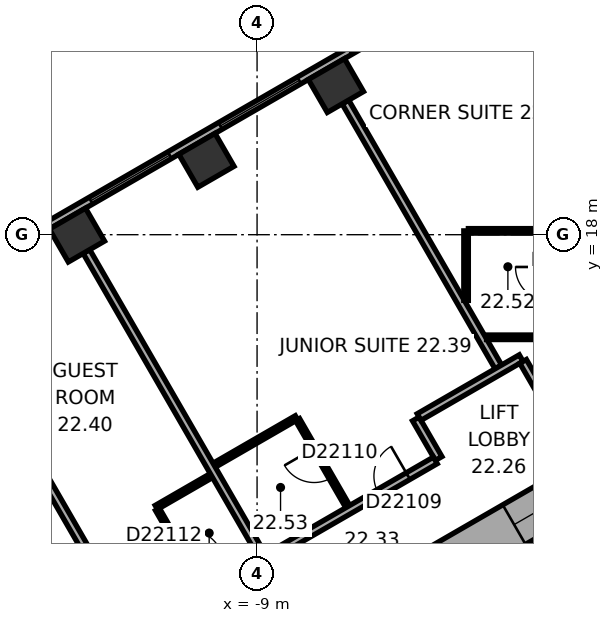
"""IFC4 building model, lengths in metres.
Left out: names, types, materials, properties, quantities, classifications, styles, units other than length and angle.
Written with IfcOpenShell. Run it as: python <this file> out.ifc"""

import sys

from ifc_helpers import new_model, si_unit, direction, frame, frame_2d, origin, origin_2d, place, context, subcontext, project, spatial, rectangle, extrude, element, fill, save


model = new_model("IFC4")
c1 = context("Model", 3, precision=1e-05, world=origin(), true_north=direction((0.0, 1.0)))
c2 = subcontext(c1, "Body", "Model", "MODEL_VIEW")
j1 = project(units=[si_unit("LENGTHUNIT", "METRE"), si_unit("PLANEANGLEUNIT", "RADIAN")], contexts=[c1])
p1 = place(None, origin())
s1 = spatial("IfcSite", under=j1, at=p1, CompositionType="ELEMENT")
p2 = place(p1, origin())
s2 = spatial("IfcBuilding", under=s1, at=p2, CompositionType="ELEMENT")
p3 = place(p2, frame((0.0, 0.0, 96.8)))
s3 = spatial("IfcBuildingStorey", under=s2, at=p3, CompositionType="ELEMENT", Elevation=96.8)
for number, where, z_axis, x_axis in (
    (1, (-6.926, 21.925, 0.0), (0.0, 0.0, 1.0), (-0.866, -0.5, 0.0)),
    (2, (-10.333, 19.957, 0.0), (0.0, 0.0, 1.0), (-0.866, -0.5, 0.0)),
    (3, (-13.74, 17.99, 0.0), (0.0, 0.0, 1.0), (-0.866, -0.5, 0.0)),
):
    element("IfcColumn", number, at=place(p3, frame(where, z_axis=z_axis, x_axis=x_axis)), inside=s3, PredefinedType="COLUMN", context=c2, shape_type="SweptSolid", body=[
        extrude(rectangle(XDim=1.1, YDim=1.0, at=origin_2d()), origin(), (0.0, 0.0, 1.0), 3.3),
    ])
p4 = place(p3, frame((0.3, 11.836, 0.0), z_axis=(0.0, 0.0, 1.0), x_axis=(-0.866021384402, -0.500006961711, 0.0)))
e4 = element("IfcWall", 4, at=p4, inside=s3, PredefinedType="SHEAR", context=c2, shape_type="SweptSolid", body=[
    extrude(rectangle(XDim=12.355, YDim=1.2, at=frame_2d((6.178, 0.0))), origin(), (0.0, 0.0, 1.0), 3.3),
])
p5 = place(p4, frame((6.378, 0.0, 0.0)))
e5 = element("IfcOpeningElement", 5, at=p5, cuts=e4, PredefinedType="OPENING", context=c2, shape_type="SweptSolid", body=[
    extrude(rectangle(XDim=1.5, YDim=2.1, at=frame_2d((0.75, 1.05))), frame((0.0, 0.61, 0.0), z_axis=(0.0, -1.0, 0.0), x_axis=(1.0, 0.0, 0.0)), (0.0, 0.0, 1.0), 1.22),
])
p6 = place(p4, frame((1.828, 0.0, 0.0)))
e6 = element("IfcOpeningElement", 6, at=p6, cuts=e4, PredefinedType="OPENING", context=c2, shape_type="SweptSolid", body=[
    extrude(rectangle(XDim=1.1, YDim=2.1, at=frame_2d((0.55, 1.05))), frame((0.0, 0.61, 0.0), z_axis=(0.0, -1.0, 0.0), x_axis=(1.0, 0.0, 0.0)), (0.0, 0.0, 1.0), 1.22),
])
p7 = place(p3, frame((-3.136, 24.805, 0.0), z_axis=(0.0, 0.0, 1.0), x_axis=(-0.866028291626, -0.499994998079, 0.0)))
e7 = element("IfcWall", 7, at=p7, inside=s3, PredefinedType="STANDARD", context=c2, shape_type="SweptSolid", body=[
    extrude(rectangle(XDim=21.246, YDim=0.2, at=frame_2d((10.623, 0.0))), origin(), (0.0, 0.0, 1.0), 3.3),
])
p8 = place(p7, frame((1.555, 0.0, 0.8)))
e8 = element("IfcOpeningElement", 8, at=p8, cuts=e7, PredefinedType="OPENING", context=c2, shape_type="SweptSolid", body=[
    extrude(rectangle(XDim=2.4, YDim=1.7, at=frame_2d((1.2, 0.85))), frame((0.0, 0.11, 0.0), z_axis=(0.0, -1.0, 0.0), x_axis=(1.0, 0.0, 0.0)), (0.0, 0.0, 1.0), 0.22),
])
p9 = place(p7, frame((5.489, 0.0, 0.8)))
e9 = element("IfcOpeningElement", 9, at=p9, cuts=e7, PredefinedType="OPENING", context=c2, shape_type="SweptSolid", body=[
    extrude(rectangle(XDim=2.4, YDim=1.7, at=frame_2d((1.2, 0.85))), frame((0.0, 0.11, 0.0), z_axis=(0.0, -1.0, 0.0), x_axis=(1.0, 0.0, 0.0)), (0.0, 0.0, 1.0), 0.22),
])
p10 = place(p7, frame((9.424, 0.0, 0.8)))
e10 = element("IfcOpeningElement", 10, at=p10, cuts=e7, PredefinedType="OPENING", context=c2, shape_type="SweptSolid", body=[
    extrude(rectangle(XDim=2.4, YDim=1.7, at=frame_2d((1.2, 0.85))), frame((0.0, 0.11, 0.0), z_axis=(0.0, -1.0, 0.0), x_axis=(1.0, 0.0, 0.0)), (0.0, 0.0, 1.0), 0.22),
])
p11 = place(p7, frame((13.358, 0.0, 0.8)))
e11 = element("IfcOpeningElement", 11, at=p11, cuts=e7, PredefinedType="OPENING", context=c2, shape_type="SweptSolid", body=[
    extrude(rectangle(XDim=2.4, YDim=1.7, at=frame_2d((1.2, 0.85))), frame((0.0, 0.11, 0.0), z_axis=(0.0, -1.0, 0.0), x_axis=(1.0, 0.0, 0.0)), (0.0, 0.0, 1.0), 0.22),
])
p12 = place(p7, frame((17.293, 0.0, 0.8)))
e12 = element("IfcOpeningElement", 12, at=p12, cuts=e7, PredefinedType="OPENING", context=c2, shape_type="SweptSolid", body=[
    extrude(rectangle(XDim=2.4, YDim=1.7, at=frame_2d((1.2, 0.85))), frame((0.0, 0.11, 0.0), z_axis=(0.0, -1.0, 0.0), x_axis=(1.0, 0.0, 0.0)), (0.0, 0.0, 1.0), 0.22),
])
p13 = place(p3, frame((-16.898, 15.59, 0.0), z_axis=(0.0, 0.0, 1.0), x_axis=(0.500023458698, -0.866011859475, 0.0)))
e13 = element("IfcWall", 13, at=p13, inside=s3, PredefinedType="PARTITIONING", context=c2, shape_type="SweptSolid", body=[
    extrude(rectangle(XDim=9.572, YDim=0.2, at=frame_2d((4.786, 0.0))), origin(), (0.0, 0.0, 1.0), 3.05),
])
p14 = place(p3, frame((-11.651, 10.825, 0.0), z_axis=(0.0, 0.0, 1.0), x_axis=(0.865998477143, 0.500046635412, 0.0)))
e14 = element("IfcWall", 14, at=p14, inside=s3, PredefinedType="PARTITIONING", context=c2, shape_type="SweptSolid", body=[
    extrude(rectangle(XDim=1.673, YDim=0.12, at=frame_2d((0.836, 0.0))), origin(), (0.0, 0.0, 1.0), 3.05),
])
p15 = place(p3, frame((-10.401, 8.66, 0.0), z_axis=(0.0, 0.0, 1.0), x_axis=(-0.500077547548, 0.865980627057, 0.0)))
e15 = element("IfcWall", 15, at=p15, inside=s3, PredefinedType="PARTITIONING", context=c2, shape_type="SweptSolid", body=[
    extrude(rectangle(XDim=2.44, YDim=0.12, at=frame_2d((1.22, 0.0))), origin(), (0.0, 0.0, 1.0), 3.05),
])
p16 = place(p15, frame((0.77, 0.0, 0.0)))
e16 = element("IfcOpeningElement", 16, at=p16, cuts=e15, PredefinedType="OPENING", context=c2, shape_type="SweptSolid", body=[
    extrude(rectangle(XDim=0.9, YDim=2.1, at=frame_2d((0.45, 1.05))), frame((0.0, 0.07, 0.0), z_axis=(0.0, -1.0, 0.0), x_axis=(1.0, 0.0, 0.0)), (0.0, 0.0, 1.0), 0.14),
])
p17 = place(p3, frame((-10.129, 11.935, 0.0), z_axis=(0.0, 0.0, 1.0), x_axis=(0.866047370643, 0.499961950354, 0.0)))
e17 = element("IfcWall", 17, at=p17, inside=s3, PredefinedType="PARTITIONING", context=c2, shape_type="SweptSolid", body=[
    extrude(rectangle(XDim=2.5, YDim=0.12, at=frame_2d((1.25, 0.0))), origin(), (0.0, 0.0, 1.0), 3.05),
])
p18 = place(p3, frame((-7.934, 13.133, 0.0), z_axis=(0.0, 0.0, 1.0), x_axis=(0.499938597367, -0.866060851709, 0.0)))
e18 = element("IfcWall", 18, at=p18, inside=s3, PredefinedType="PARTITIONING", context=c2, shape_type="SweptSolid", body=[
    extrude(rectangle(XDim=2.64, YDim=0.12, at=frame_2d((1.32, 0.0))), origin(), (0.0, 0.0, 1.0), 3.05),
])
p19 = place(p18, frame((0.87, 0.0, 0.0)))
e19 = element("IfcOpeningElement", 19, at=p19, cuts=e18, PredefinedType="OPENING", context=c2, shape_type="SweptSolid", body=[
    extrude(rectangle(XDim=0.9, YDim=2.1, at=frame_2d((0.45, 1.05))), frame((0.0, 0.07, 0.0), z_axis=(0.0, -1.0, 0.0), x_axis=(1.0, 0.0, 0.0)), (0.0, 0.0, 1.0), 0.14),
])
p20 = place(p3, frame((-7.865, 7.814, 0.0), z_axis=(0.0, 0.0, 1.0), x_axis=(-0.500004234368, 0.866022959057, 0.0)))
e20 = element("IfcWall", 20, at=p20, inside=s3, PredefinedType="PARTITIONING", context=c2, shape_type="SweptSolid", body=[
    extrude(rectangle(XDim=11.25, YDim=0.2, at=frame_2d((5.625, 0.0))), origin(), (0.0, 0.0, 1.0), 3.05),
])
p21 = place(p20, frame((0.5, 0.0, 0.0)))
e21 = element("IfcOpeningElement", 21, at=p21, cuts=e20, PredefinedType="OPENING", context=c2, shape_type="SweptSolid", body=[
    extrude(rectangle(XDim=0.9, YDim=2.1, at=frame_2d((0.45, 1.05))), frame((0.0, 0.11, 0.0), z_axis=(0.0, -1.0, 0.0), x_axis=(1.0, 0.0, 0.0)), (0.0, 0.0, 1.0), 0.22),
])
p22 = place(p3, frame((-6.676, 21.492, 0.0), z_axis=(0.0, 0.0, 1.0), x_axis=(0.500011263043, -0.866018900966, 0.0)))
e22 = element("IfcWall", 22, at=p22, inside=s3, PredefinedType="PARTITIONING", context=c2, shape_type="SweptSolid", body=[
    extrude(rectangle(XDim=8.049, YDim=0.2, at=frame_2d((4.024, 0.0))), origin(), (0.0, 0.0, 1.0), 3.05),
])
p23 = place(p3, frame((-4.823, 13.152, 0.0), z_axis=(0.0, 0.0, 1.0), x_axis=(0.499986357472, -0.866033280158, 0.0)))
e23 = element("IfcWall", 23, at=p23, inside=s3, PredefinedType="PARTITIONING", context=c2, shape_type="SweptSolid", body=[
    extrude(rectangle(XDim=1.201, YDim=0.2, at=frame_2d((0.601, 0.0))), origin(), (0.0, 0.0, 1.0), 3.05),
])
p24 = place(p3, frame((-4.309, 12.061, 0.0), z_axis=(0.0, 0.0, 1.0), x_axis=(-0.866020679205, -0.500008183122, 0.0)))
e24 = element("IfcWall", 24, at=p24, inside=s3, PredefinedType="PARTITIONING", context=c2, shape_type="SweptSolid", body=[
    extrude(rectangle(XDim=5.104, YDim=0.2, at=frame_2d((2.552, 0.0))), origin(), (0.0, 0.0, 1.0), 3.05),
])
p25 = place(p24, frame((0.827, 0.0, 0.0)))
e25 = element("IfcOpeningElement", 25, at=p25, cuts=e24, PredefinedType="OPENING", context=c2, shape_type="SweptSolid", body=[
    extrude(rectangle(XDim=0.9, YDim=2.1, at=frame_2d((0.45, 1.05))), frame((0.0, 0.11, 0.0), z_axis=(0.0, -1.0, 0.0), x_axis=(1.0, 0.0, 0.0)), (0.0, 0.0, 1.0), 0.22),
])
p26 = place(p3, frame((-3.5, 16.271, 0.0), z_axis=(0.0, 0.0, 1.0), x_axis=(0.0, 1.0, 0.0)))
e26 = element("IfcWall", 26, at=p26, inside=s3, PredefinedType="PARTITIONING", context=c2, shape_type="SweptSolid", body=[
    extrude(rectangle(XDim=1.829, YDim=0.12, at=frame_2d((0.915, 0.0))), origin(), (0.0, 0.0, 1.0), 3.05),
])
p27 = place(p3, frame((-3.44, 18.101, 0.0), z_axis=(0.0, 0.0, 1.0), x_axis=(1.0, 0.0, 0.0)))
e27 = element("IfcWall", 27, at=p27, inside=s3, PredefinedType="PARTITIONING", context=c2, shape_type="SweptSolid", body=[
    extrude(rectangle(XDim=2.14, YDim=0.12, at=frame_2d((1.07, 0.0))), origin(), (0.0, 0.0, 1.0), 3.05),
])
p28 = place(p3, frame((-2.05, 14.752, 0.0), z_axis=(0.0, 0.0, 1.0), x_axis=(-0.866030936828, -0.499990416364, 0.0)))
e28 = element("IfcWall", 28, at=p28, inside=s3, PredefinedType="PARTITIONING", context=c2, shape_type="SweptSolid", body=[
    extrude(rectangle(XDim=3.102, YDim=0.2, at=frame_2d((1.551, 0.0))), origin(), (0.0, 0.0, 1.0), 3.05),
])
p29 = place(p3, frame((-1.449, 13.712, 0.0), z_axis=(0.0, 0.0, 1.0), x_axis=(-0.499978356969, 0.866037899034, 0.0)))
e29 = element("IfcWall", 29, at=p29, inside=s3, PredefinedType="PARTITIONING", context=c2, shape_type="SweptSolid", body=[
    extrude(rectangle(XDim=1.101, YDim=0.2, at=frame_2d((0.551, 0.0))), origin(), (0.0, 0.0, 1.0), 3.05),
])
p30 = place(p3, frame((-1.3, 15.301, 0.0), z_axis=(0.0, 0.0, 1.0), x_axis=(-1.0, 0.0, 0.0)))
e30 = element("IfcWall", 30, at=p30, inside=s3, PredefinedType="PARTITIONING", context=c2, shape_type="SweptSolid", body=[
    extrude(rectangle(XDim=1.661, YDim=0.12, at=frame_2d((0.831, 0.0))), origin(), (0.0, 0.0, 1.0), 3.05),
])
p31 = place(p9, origin())
e31 = element("IfcWindow", 31, at=p31, inside=s3, PartitioningType="SINGLE_PANEL", PredefinedType="WINDOW", context=c2, shape_type="SweptSolid", body=[
    extrude(rectangle(XDim=2.4, YDim=1.7, at=frame_2d((1.2, 0.85))), frame((0.0, 0.03, 0.0), z_axis=(0.0, -1.0, 0.0), x_axis=(1.0, 0.0, 0.0)), (0.0, 0.0, 1.0), 0.06),
])
fill(e9, e31)
p32 = place(p10, origin())
e32 = element("IfcWindow", 32, at=p32, inside=s3, PartitioningType="SINGLE_PANEL", PredefinedType="WINDOW", context=c2, shape_type="SweptSolid", body=[
    extrude(rectangle(XDim=2.4, YDim=1.7, at=frame_2d((1.2, 0.85))), frame((0.0, 0.03, 0.0), z_axis=(0.0, -1.0, 0.0), x_axis=(1.0, 0.0, 0.0)), (0.0, 0.0, 1.0), 0.06),
])
fill(e10, e32)
p33 = place(p6, origin())
e33 = element("IfcDoor", 33, at=p33, inside=s3, OperationType="DOUBLE_DOOR_SLIDING", PredefinedType="DOOR", context=c2, shape_type="SweptSolid", body=[
    extrude(rectangle(XDim=1.1, YDim=2.1, at=frame_2d((0.55, 1.05))), frame((0.0, 0.025, 0.0), z_axis=(0.0, -1.0, 0.0), x_axis=(1.0, 0.0, 0.0)), (0.0, 0.0, 1.0), 0.05),
])
fill(e6, e33)
p34 = place(p25, origin())
e34 = element("IfcDoor", 34, at=p34, inside=s3, OperationType="SINGLE_SWING_LEFT", PredefinedType="DOOR", context=c2, shape_type="SweptSolid", body=[
    extrude(rectangle(XDim=0.9, YDim=2.1, at=frame_2d((0.45, 1.05))), frame((0.0, 0.025, 0.0), z_axis=(0.0, -1.0, 0.0), x_axis=(1.0, 0.0, 0.0)), (0.0, 0.0, 1.0), 0.05),
])
fill(e25, e34)
p35 = place(p19, origin())
e35 = element("IfcDoor", 35, at=p35, inside=s3, OperationType="SINGLE_SWING_LEFT", PredefinedType="DOOR", context=c2, shape_type="SweptSolid", body=[
    extrude(rectangle(XDim=0.9, YDim=2.1, at=frame_2d((0.45, 1.05))), frame((0.0, 0.025, 0.0), z_axis=(0.0, -1.0, 0.0), x_axis=(1.0, 0.0, 0.0)), (0.0, 0.0, 1.0), 0.05),
])
fill(e19, e35)
p36 = place(p16, origin())
e36 = element("IfcDoor", 36, at=p36, inside=s3, OperationType="SINGLE_SWING_LEFT", PredefinedType="DOOR", context=c2, shape_type="SweptSolid", body=[
    extrude(rectangle(XDim=0.9, YDim=2.1, at=frame_2d((0.45, 1.05))), frame((0.0, 0.025, 0.0), z_axis=(0.0, -1.0, 0.0), x_axis=(1.0, 0.0, 0.0)), (0.0, 0.0, 1.0), 0.05),
])
fill(e16, e36)
save(model, sys.argv[1])
